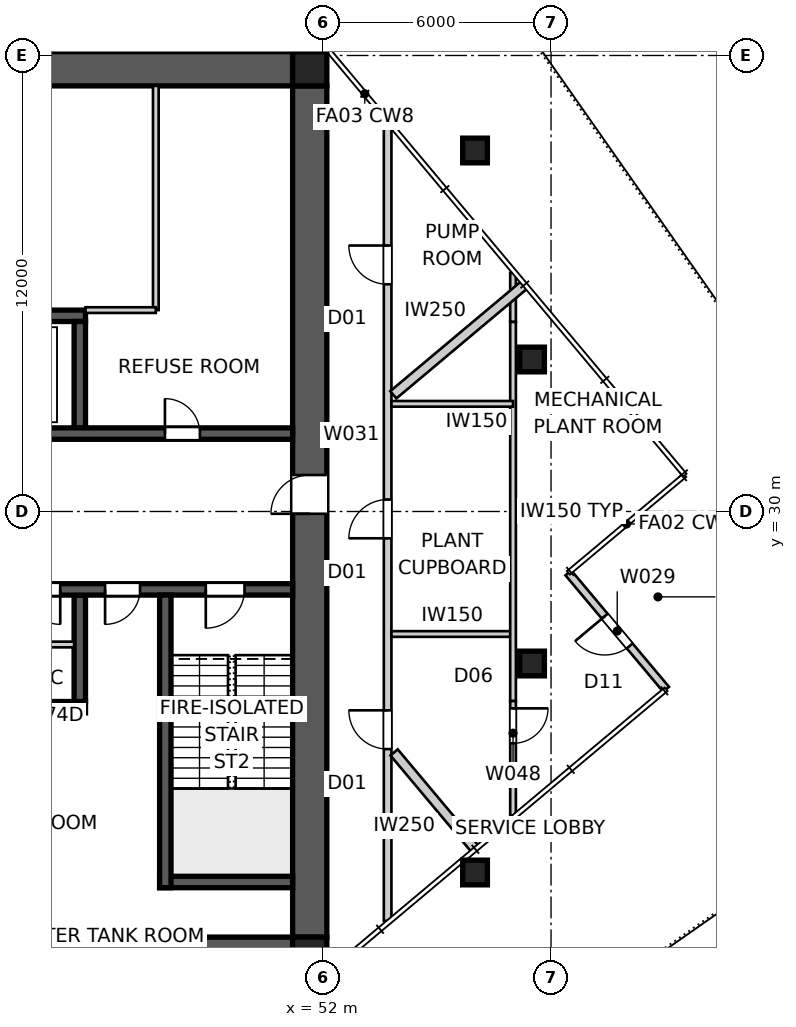
"""IFC4 building model, lengths in metres.
Left out: names, types, materials, properties, quantities, classifications, styles, units other than length and angle.
Written with IfcOpenShell. Run it as: python <this file> out.ifc"""

import sys

from ifc_helpers import new_model, si_unit, direction, frame, frame_2d, origin, origin_2d, place, context, subcontext, project, spatial, polyline, rectangle, outline, extrude, element, fill, save


model = new_model("IFC4")
c1 = context("Model", 3, precision=1e-05, world=origin(), true_north=direction((0.0, 1.0)))
c2 = subcontext(c1, "Body", "Model", "MODEL_VIEW")
j1 = project(units=[si_unit("LENGTHUNIT", "METRE"), si_unit("PLANEANGLEUNIT", "RADIAN")], contexts=[c1])
p1 = place(None, origin())
s1 = spatial("IfcSite", under=j1, at=p1, CompositionType="ELEMENT")
p2 = place(p1, origin())
s2 = spatial("IfcBuilding", under=s1, at=p2, CompositionType="ELEMENT")
p3 = place(p2, frame((0.0, 0.0, 267.6)))
s3 = spatial("IfcBuildingStorey", under=s2, at=p3, CompositionType="ELEMENT", Elevation=267.6)
for number, where, z_axis, x_axis in (
    (1, (28.8, 41.65, 0.0), (0.0, 0.0, 1.0), (1.0, 0.0, 0.0)),
    (2, (51.2, 18.35, 0.0), (0.0, 0.0, 1.0), (-1.0, 0.0, 0.0)),
):
    element("IfcWall", number, at=place(p3, frame(where, z_axis=z_axis, x_axis=x_axis)), inside=s3, PredefinedType="SHEAR", context=c2, shape_type="SweptSolid", body=[
        extrude(outline(polyline([(0.0, -0.45), (22.4, -0.45), (22.4, -0.025), (22.85, -0.025), (22.85, 0.025), (22.4, 0.025), (22.4, 0.45), (0.0, 0.45), (0.0, 0.025), (-0.45, 0.025), (-0.45, -0.025), (0.0, -0.025), (0.0, -0.45)])), origin(), (0.0, 0.0, 1.0), 5.0),
    ])
p4 = place(p3, frame((51.65, 18.8, 0.0), z_axis=(0.0, 0.0, 1.0), x_axis=(0.0, 1.0, 0.0)))
e3 = element("IfcWall", 3, at=p4, inside=s3, PredefinedType="SHEAR", context=c2, shape_type="SweptSolid", body=[
    extrude(outline(polyline([(0.0, -0.45), (22.4, -0.45), (22.4, -0.025), (22.85, -0.025), (22.85, 0.025), (22.4, 0.025), (22.4, 0.45), (0.0, 0.45), (0.0, 0.025), (-0.45, 0.025), (-0.45, -0.025), (0.0, -0.025), (0.0, -0.45)])), origin(), (0.0, 0.0, 1.0), 5.0),
])
p5 = place(p4, frame((11.14, 0.0, 0.0)))
e4 = element("IfcOpeningElement", 4, at=p5, cuts=e3, PredefinedType="OPENING", context=c2, shape_type="SweptSolid", body=[
    extrude(rectangle(XDim=1.02, YDim=2.4, at=frame_2d((0.51, 1.2))), frame((0.0, 0.46, 0.0), z_axis=(0.0, -1.0, 0.0), x_axis=(1.0, 0.0, 0.0)), (0.0, 0.0, 1.0), 0.92),
])
p6 = place(p3, frame((28.8, 32.05, 0.0), z_axis=(0.0, 0.0, 1.0), x_axis=(1.0, 0.0, 0.0)))
e5 = element("IfcWall", 5, at=p6, inside=s3, PredefinedType="SHEAR", context=c2, shape_type="SweptSolid", body=[
    extrude(rectangle(XDim=22.4, YDim=0.3, at=frame_2d((11.2, 0.0))), origin(), (0.0, 0.0, 1.0), 5.0),
])
p7 = place(p6, frame((19.04, 0.0, 0.0)))
e6 = element("IfcOpeningElement", 6, at=p7, cuts=e5, PredefinedType="OPENING", context=c2, shape_type="SweptSolid", body=[
    extrude(rectangle(XDim=0.92, YDim=2.1, at=frame_2d((0.46, 1.05))), frame((0.0, 0.16, 0.0), z_axis=(0.0, -1.0, 0.0), x_axis=(1.0, 0.0, 0.0)), (0.0, 0.0, 1.0), 0.32),
])
p8 = place(p6, frame((1.265, 0.0, 0.0)))
e7 = element("IfcOpeningElement", 7, at=p8, cuts=e5, PredefinedType="OPENING", context=c2, shape_type="SweptSolid", body=[
    extrude(rectangle(XDim=1.02, YDim=2.1, at=frame_2d((0.51, 1.05))), frame((0.0, 0.16, 0.0), z_axis=(0.0, -1.0, 0.0), x_axis=(1.0, 0.0, 0.0)), (0.0, 0.0, 1.0), 0.32),
])
p9 = place(p6, frame((4.015, 0.0, 0.0)))
e8 = element("IfcOpeningElement", 8, at=p9, cuts=e5, PredefinedType="OPENING", context=c2, shape_type="SweptSolid", body=[
    extrude(rectangle(XDim=0.92, YDim=2.1, at=frame_2d((0.46, 1.05))), frame((0.0, 0.16, 0.0), z_axis=(0.0, -1.0, 0.0), x_axis=(1.0, 0.0, 0.0)), (0.0, 0.0, 1.0), 0.32),
])
p10 = place(p6, frame((7.015, 0.0, 0.0)))
e9 = element("IfcOpeningElement", 9, at=p10, cuts=e5, PredefinedType="OPENING", context=c2, shape_type="SweptSolid", body=[
    extrude(rectangle(XDim=0.92, YDim=2.1, at=frame_2d((0.46, 1.05))), frame((0.0, 0.16, 0.0), z_axis=(0.0, -1.0, 0.0), x_axis=(1.0, 0.0, 0.0)), (0.0, 0.0, 1.0), 0.32),
])
p11 = place(p6, frame((9.34, 0.0, 0.0)))
e10 = element("IfcOpeningElement", 10, at=p11, cuts=e5, PredefinedType="OPENING", context=c2, shape_type="SweptSolid", body=[
    extrude(rectangle(XDim=0.92, YDim=2.1, at=frame_2d((0.46, 1.05))), frame((0.0, 0.16, 0.0), z_axis=(0.0, -1.0, 0.0), x_axis=(1.0, 0.0, 0.0)), (0.0, 0.0, 1.0), 0.32),
])
p12 = place(p6, frame((12.05, 0.0, 0.0)))
e11 = element("IfcOpeningElement", 11, at=p12, cuts=e5, PredefinedType="OPENING", context=c2, shape_type="SweptSolid", body=[
    extrude(rectangle(XDim=1.1, YDim=2.1, at=frame_2d((0.55, 1.05))), frame((0.0, 0.16, 0.0), z_axis=(0.0, -1.0, 0.0), x_axis=(1.0, 0.0, 0.0)), (0.0, 0.0, 1.0), 0.32),
])
p13 = place(p6, frame((14.85, 0.0, 0.0)))
e12 = element("IfcOpeningElement", 12, at=p13, cuts=e5, PredefinedType="OPENING", context=c2, shape_type="SweptSolid", body=[
    extrude(rectangle(XDim=1.1, YDim=2.1, at=frame_2d((0.55, 1.05))), frame((0.0, 0.16, 0.0), z_axis=(0.0, -1.0, 0.0), x_axis=(1.0, 0.0, 0.0)), (0.0, 0.0, 1.0), 0.32),
])
p14 = place(p3, frame((51.2, 27.95, 0.0), z_axis=(0.0, 0.0, 1.0), x_axis=(-1.0, 0.0, 0.0)))
e13 = element("IfcWall", 13, at=p14, inside=s3, PredefinedType="SHEAR", context=c2, shape_type="SweptSolid", body=[
    extrude(rectangle(XDim=22.4, YDim=0.3, at=frame_2d((11.2, 0.0))), origin(), (0.0, 0.0, 1.0), 5.0),
])
p15 = place(p14, frame((19.04, 0.0, 0.0)))
e14 = element("IfcOpeningElement", 14, at=p15, cuts=e13, PredefinedType="OPENING", context=c2, shape_type="SweptSolid", body=[
    extrude(rectangle(XDim=0.92, YDim=2.1, at=frame_2d((0.46, 1.05))), frame((0.0, 0.16, 0.0), z_axis=(0.0, -1.0, 0.0), x_axis=(1.0, 0.0, 0.0)), (0.0, 0.0, 1.0), 0.32),
])
p16 = place(p14, frame((1.265, 0.0, 0.0)))
e15 = element("IfcOpeningElement", 15, at=p16, cuts=e13, PredefinedType="OPENING", context=c2, shape_type="SweptSolid", body=[
    extrude(rectangle(XDim=1.02, YDim=2.1, at=frame_2d((0.51, 1.05))), frame((0.0, 0.16, 0.0), z_axis=(0.0, -1.0, 0.0), x_axis=(1.0, 0.0, 0.0)), (0.0, 0.0, 1.0), 0.32),
])
p17 = place(p14, frame((4.015, 0.0, 0.0)))
e16 = element("IfcOpeningElement", 16, at=p17, cuts=e13, PredefinedType="OPENING", context=c2, shape_type="SweptSolid", body=[
    extrude(rectangle(XDim=0.92, YDim=2.1, at=frame_2d((0.46, 1.05))), frame((0.0, 0.16, 0.0), z_axis=(0.0, -1.0, 0.0), x_axis=(1.0, 0.0, 0.0)), (0.0, 0.0, 1.0), 0.32),
])
p18 = place(p14, frame((9.79, 0.0, 0.0)))
e17 = element("IfcOpeningElement", 17, at=p18, cuts=e13, PredefinedType="OPENING", context=c2, shape_type="SweptSolid", body=[
    extrude(rectangle(XDim=0.92, YDim=2.1, at=frame_2d((0.46, 1.05))), frame((0.0, 0.16, 0.0), z_axis=(0.0, -1.0, 0.0), x_axis=(1.0, 0.0, 0.0)), (0.0, 0.0, 1.0), 0.32),
])
p19 = place(p14, frame((6.115, 0.0, 0.0)))
e18 = element("IfcOpeningElement", 18, at=p19, cuts=e13, PredefinedType="OPENING", context=c2, shape_type="SweptSolid", body=[
    extrude(rectangle(XDim=0.92, YDim=2.1, at=frame_2d((0.46, 1.05))), frame((0.0, 0.16, 0.0), z_axis=(0.0, -1.0, 0.0), x_axis=(1.0, 0.0, 0.0)), (0.0, 0.0, 1.0), 0.32),
])
p20 = place(p14, frame((12.05, 0.0, 0.0)))
e19 = element("IfcOpeningElement", 19, at=p20, cuts=e13, PredefinedType="OPENING", context=c2, shape_type="SweptSolid", body=[
    extrude(rectangle(XDim=1.1, YDim=2.1, at=frame_2d((0.55, 1.05))), frame((0.0, 0.16, 0.0), z_axis=(0.0, -1.0, 0.0), x_axis=(1.0, 0.0, 0.0)), (0.0, 0.0, 1.0), 0.32),
])
p21 = place(p14, frame((14.85, 0.0, 0.0)))
e20 = element("IfcOpeningElement", 20, at=p21, cuts=e13, PredefinedType="OPENING", context=c2, shape_type="SweptSolid", body=[
    extrude(rectangle(XDim=1.1, YDim=2.1, at=frame_2d((0.55, 1.05))), frame((0.0, 0.16, 0.0), z_axis=(0.0, -1.0, 0.0), x_axis=(1.0, 0.0, 0.0)), (0.0, 0.0, 1.0), 0.32),
])
for number, where, z_axis, x_axis in (
    (21, (34.25, 35.15, 0.0), (0.0, 0.0, 1.0), (1.0, 0.0, 0.0)),
    (22, (45.75, 24.85, 0.0), (0.0, 0.0, 1.0), (-1.0, 0.0, 0.0)),
):
    element("IfcWall", number, at=place(p3, frame(where, z_axis=z_axis, x_axis=x_axis)), inside=s3, PredefinedType="SHEAR", context=c2, shape_type="SweptSolid", body=[
        extrude(rectangle(XDim=11.5, YDim=0.3, at=frame_2d((5.75, 0.0))), origin(), (0.0, 0.0, 1.0), 5.0),
    ])
for number, where, z_axis, x_axis in (
    (23, (45.6, 27.8, 0.0), (0.0, 0.0, 1.0), (0.0, -1.0, 0.0)),
    (24, (45.6, 32.2, 0.0), (0.0, 0.0, 1.0), (0.0, 1.0, 0.0)),
):
    element("IfcWall", number, at=place(p3, frame(where, z_axis=z_axis, x_axis=x_axis)), inside=s3, PredefinedType="SHEAR", context=c2, shape_type="SweptSolid", body=[
        extrude(rectangle(XDim=2.8, YDim=0.3, at=frame_2d((1.4, 0.0))), origin(), (0.0, 0.0, 1.0), 5.0),
    ])
p22 = place(p3, frame((47.85, 27.8, 0.0), z_axis=(0.0, 0.0, 1.0), x_axis=(0.0, -1.0, 0.0)))
e25 = element("IfcWall", 25, at=p22, inside=s3, PredefinedType="SHEAR", context=c2, shape_type="SweptSolid", body=[
    extrude(rectangle(XDim=7.7, YDim=0.3, at=frame_2d((3.85, 0.0))), origin(), (0.0, 0.0, 1.0), 5.0),
])
p23 = place(p3, frame((51.2, 20.25, 0.0), z_axis=(0.0, 0.0, 1.0), x_axis=(-1.0, 0.0, 0.0)))
e26 = element("IfcWall", 26, at=p23, inside=s3, PredefinedType="SHEAR", context=c2, shape_type="SweptSolid", body=[
    extrude(rectangle(XDim=3.5, YDim=0.3, at=frame_2d((1.75, 0.0))), origin(), (0.0, 0.0, 1.0), 5.0),
])
for number, where, z_axis, x_axis in (
    (27, (51.65, 18.35, 0.0), (0.0, 0.0, 1.0), (1.0, 0.0, 0.0)),
    (28, (51.65, 41.65, 0.0), (0.0, 0.0, 1.0), (1.0, 0.0, 0.0)),
):
    element("IfcColumn", number, at=place(p3, frame(where, z_axis=z_axis, x_axis=x_axis)), inside=s3, PredefinedType="COLUMN", context=c2, shape_type="SweptSolid", body=[
        extrude(rectangle(XDim=0.9, YDim=0.9, at=origin_2d()), origin(), (0.0, 0.0, 1.0), 5.0),
    ])
for number, where, z_axis, x_axis in (
    (29, (57.5, 26.0, 0.0), (0.0, 0.0, 1.0), (1.0, 0.0, 0.0)),
    (30, (57.5, 34.0, 0.0), (0.0, 0.0, 1.0), (1.0, 0.0, 0.0)),
    (31, (56.0, 39.5, 0.0), (0.0, 0.0, 1.0), (1.0, 0.0, 0.0)),
    (32, (56.0, 20.5, 0.0), (0.0, 0.0, 1.0), (1.0, 0.0, 0.0)),
):
    element("IfcColumn", number, at=place(p3, frame(where, z_axis=z_axis, x_axis=x_axis)), inside=s3, PredefinedType="COLUMN", context=c2, shape_type="SweptSolid", body=[
        extrude(rectangle(XDim=0.65, YDim=0.65, at=origin_2d()), origin(), (0.0, 0.0, 1.0), 5.0),
    ])
p24 = place(p3, frame((61.027, 25.321, 0.0), z_axis=(0.0, 0.0, 1.0), x_axis=(-0.642768287094, 0.766060656284, 0.0)))
e33 = element("IfcWall", 33, at=p24, inside=s3, PredefinedType="SOLIDWALL", context=c2, shape_type="SweptSolid", body=[
    extrude(rectangle(XDim=4.0, YDim=0.2, at=frame_2d((2.0, 0.0))), origin(), (0.0, 0.0, 1.0), 4.85),
])
p25 = place(p24, frame((1.49, 0.0, 0.0)))
e34 = element("IfcOpeningElement", 34, at=p25, cuts=e33, PredefinedType="OPENING", context=c2, shape_type="SweptSolid", body=[
    extrude(rectangle(XDim=1.02, YDim=2.1, at=frame_2d((0.51, 1.05))), frame((0.0, 0.11, 0.0), z_axis=(0.0, -1.0, 0.0), x_axis=(1.0, 0.0, 0.0)), (0.0, 0.0, 1.0), 0.22),
])
p26 = place(p3, frame((53.7, 19.225, 0.0), z_axis=(0.0, 0.0, 1.0), x_axis=(0.0, 1.0, 0.0)))
e35 = element("IfcWall", 35, at=p26, inside=s3, PredefinedType="PARTITIONING", context=c2, shape_type="SweptSolid", body=[
    extrude(rectangle(XDim=20.988, YDim=0.2, at=frame_2d((10.494, 0.0))), origin(), (0.0, 0.0, 1.0), 4.85),
])
p27 = place(p26, frame((4.522, 0.0, 0.0)))
e36 = element("IfcOpeningElement", 36, at=p27, cuts=e35, PredefinedType="OPENING", context=c2, shape_type="SweptSolid", body=[
    extrude(rectangle(XDim=1.02, YDim=2.34, at=frame_2d((0.51, 1.17))), frame((0.0, 0.11, 0.0), z_axis=(0.0, -1.0, 0.0), x_axis=(1.0, 0.0, 0.0)), (0.0, 0.0, 1.0), 0.22),
])
p28 = place(p26, frame((16.754, 0.0, 0.0)))
e37 = element("IfcOpeningElement", 37, at=p28, cuts=e35, PredefinedType="OPENING", context=c2, shape_type="SweptSolid", body=[
    extrude(rectangle(XDim=1.02, YDim=2.34, at=frame_2d((0.51, 1.17))), frame((0.0, 0.11, 0.0), z_axis=(0.0, -1.0, 0.0), x_axis=(1.0, 0.0, 0.0)), (0.0, 0.0, 1.0), 0.22),
])
p29 = place(p26, frame((10.069, 0.0, 0.0)))
e38 = element("IfcOpeningElement", 38, at=p29, cuts=e35, PredefinedType="OPENING", context=c2, shape_type="SweptSolid", body=[
    extrude(rectangle(XDim=1.02, YDim=2.34, at=frame_2d((0.51, 1.17))), frame((0.0, 0.11, 0.0), z_axis=(0.0, -1.0, 0.0), x_axis=(1.0, 0.0, 0.0)), (0.0, 0.0, 1.0), 0.22),
])
p30 = place(p3, frame((56.009, 21.111, 0.0), z_axis=(0.0, 0.0, 1.0), x_axis=(-0.642756724565, 0.766070357753, 0.0)))
e39 = element("IfcWall", 39, at=p30, inside=s3, PredefinedType="PARTITIONING", context=c2, shape_type="SweptSolid", body=[
    extrude(rectangle(XDim=3.328, YDim=0.25, at=frame_2d((1.664, 0.0))), origin(), (0.0, 0.0, 1.0), 4.85),
])
p31 = place(p3, frame((57.31, 35.974, 0.0), z_axis=(0.0, 0.0, 1.0), x_axis=(-0.766036989917, -0.642796491962, 0.0)))
e40 = element("IfcWall", 40, at=p31, inside=s3, PredefinedType="PARTITIONING", context=c2, shape_type="SweptSolid", body=[
    extrude(rectangle(XDim=4.517, YDim=0.25, at=frame_2d((2.258, 0.0))), origin(), (0.0, 0.0, 1.0), 4.85),
])
p32 = place(p3, frame((47.6, 41.2, 0.0), z_axis=(0.0, 0.0, 1.0), x_axis=(0.0, -1.0, 0.0)))
e41 = element("IfcWall", 41, at=p32, inside=s3, PredefinedType="SOLIDWALL", context=c2, shape_type="SweptSolid", body=[
    extrude(rectangle(XDim=5.9, YDim=0.15, at=frame_2d((2.95, 0.0))), origin(), (0.0, 0.0, 1.0), 4.85),
])
p33 = place(p3, frame((47.6, 35.3, 0.0), z_axis=(0.0, 0.0, 1.0), x_axis=(-1.0, 0.0, 0.0)))
e42 = element("IfcWall", 42, at=p33, inside=s3, PredefinedType="SOLIDWALL", context=c2, shape_type="SweptSolid", body=[
    extrude(rectangle(XDim=1.85, YDim=0.15, at=frame_2d((0.925, 0.0))), origin(), (0.0, 0.0, 1.0), 4.85),
])
p34 = place(p3, frame((53.8, 26.776, 0.0), z_axis=(0.0, 0.0, 1.0), x_axis=(1.0, 0.0, 0.0)))
e43 = element("IfcWall", 43, at=p34, inside=s3, PredefinedType="SOLIDWALL", context=c2, shape_type="SweptSolid", body=[
    extrude(rectangle(XDim=3.2, YDim=0.15, at=frame_2d((1.6, 0.0))), origin(), (0.0, 0.0, 1.0), 4.85),
])
p35 = place(p3, frame((57.0, 36.281, 0.0), z_axis=(0.0, 0.0, 1.0), x_axis=(0.0, -1.0, 0.0)))
e44 = element("IfcWall", 44, at=p35, inside=s3, PredefinedType="SOLIDWALL", context=c2, shape_type="SweptSolid", body=[
    extrude(rectangle(XDim=1.292, YDim=0.15, at=frame_2d((0.646, 0.0))), origin(), (0.0, 0.0, 1.0), 3.85),
])
p36 = place(p3, frame((57.0, 34.988, 0.0), z_axis=(0.0, 0.0, 1.0), x_axis=(0.0, -1.0, 0.0)))
e45 = element("IfcWall", 45, at=p36, inside=s3, PredefinedType="SOLIDWALL", context=c2, shape_type="SweptSolid", body=[
    extrude(rectangle(XDim=9.977, YDim=0.15, at=frame_2d((4.988, 0.0))), origin(), (0.0, 0.0, 1.0), 4.85),
])
p37 = place(p3, frame((57.0, 25.012, 0.0), z_axis=(0.0, 0.0, 1.0), x_axis=(0.0, -1.0, 0.0)))
e46 = element("IfcWall", 46, at=p37, inside=s3, PredefinedType="SOLIDWALL", context=c2, shape_type="SweptSolid", body=[
    extrude(rectangle(XDim=1.69, YDim=0.15, at=frame_2d((0.845, 0.0))), origin(), (0.0, 0.0, 1.0), 3.85),
])
p38 = place(p37, frame((0.193, 0.0, 0.0)))
e47 = element("IfcOpeningElement", 47, at=p38, cuts=e46, PredefinedType="OPENING", context=c2, shape_type="SweptSolid", body=[
    extrude(rectangle(XDim=0.92, YDim=2.1, at=frame_2d((0.46, 1.05))), frame((0.0, 0.085, 0.0), z_axis=(0.0, -1.0, 0.0), x_axis=(1.0, 0.0, 0.0)), (0.0, 0.0, 1.0), 0.17),
])
p39 = place(p3, frame((57.0, 23.322, 0.0), z_axis=(0.0, 0.0, 1.0), x_axis=(0.0, -1.0, 0.0)))
e48 = element("IfcWall", 48, at=p39, inside=s3, PredefinedType="SOLIDWALL", context=c2, shape_type="SweptSolid", body=[
    extrude(rectangle(XDim=1.327, YDim=0.15, at=frame_2d((0.664, 0.0))), origin(), (0.0, 0.0, 1.0), 4.85),
])
p40 = place(p3, frame((57.0, 32.833, 0.0), z_axis=(0.0, 0.0, 1.0), x_axis=(-1.0, 0.0, 0.0)))
e49 = element("IfcWall", 49, at=p40, inside=s3, PredefinedType="SOLIDWALL", context=c2, shape_type="SweptSolid", body=[
    extrude(rectangle(XDim=3.2, YDim=0.15, at=frame_2d((1.6, 0.0))), origin(), (0.0, 0.0, 1.0), 4.321),
])
p41 = place(p3, frame((40.1, 26.5, 0.0), z_axis=(0.0, 0.0, 1.0), x_axis=(1.0, 0.0, 0.0)))
e50 = element("IfcWall", 50, at=p41, inside=s3, PredefinedType="SOLIDWALL", context=c2, shape_type="SweptSolid", body=[
    extrude(rectangle(XDim=5.35, YDim=0.15, at=frame_2d((2.675, 0.0))), origin(), (0.0, 0.0, 1.0), 4.85),
])
p42 = place(p41, frame((2.215, 0.0, 0.0)))
e51 = element("IfcOpeningElement", 51, at=p42, cuts=e50, PredefinedType="OPENING", context=c2, shape_type="SweptSolid", body=[
    extrude(rectangle(XDim=0.92, YDim=2.1, at=frame_2d((0.46, 1.05))), frame((0.0, 0.085, 0.0), z_axis=(0.0, -1.0, 0.0), x_axis=(1.0, 0.0, 0.0)), (0.0, 0.0, 1.0), 0.17),
])
p43 = place(p25, origin())
e52 = element("IfcDoor", 52, at=p43, inside=s3, OperationType="SINGLE_SWING_RIGHT", PredefinedType="DOOR", context=c2, shape_type="SweptSolid", body=[
    extrude(rectangle(XDim=1.02, YDim=2.1, at=frame_2d((0.51, 1.05))), frame((0.0, 0.025, 0.0), z_axis=(0.0, -1.0, 0.0), x_axis=(1.0, 0.0, 0.0)), (0.0, 0.0, 1.0), 0.05),
])
fill(e34, e52)
p44 = place(p7, origin())
e53 = element("IfcDoor", 53, at=p44, inside=s3, OperationType="SINGLE_SWING_LEFT", PredefinedType="DOOR", context=c2, shape_type="SweptSolid", body=[
    extrude(rectangle(XDim=0.92, YDim=2.1, at=frame_2d((0.46, 1.05))), frame((0.0, 0.025, 0.0), z_axis=(0.0, -1.0, 0.0), x_axis=(1.0, 0.0, 0.0)), (0.0, 0.0, 1.0), 0.05),
])
fill(e6, e53)
p45 = place(p16, origin())
e54 = element("IfcDoor", 54, at=p45, inside=s3, OperationType="SINGLE_SWING_RIGHT", PredefinedType="DOOR", context=c2, shape_type="SweptSolid", body=[
    extrude(rectangle(XDim=1.02, YDim=2.1, at=frame_2d((0.51, 1.05))), frame((0.0, 0.025, 0.0), z_axis=(0.0, -1.0, 0.0), x_axis=(1.0, 0.0, 0.0)), (0.0, 0.0, 1.0), 0.05),
])
fill(e15, e54)
p46 = place(p17, origin())
e55 = element("IfcDoor", 55, at=p46, inside=s3, OperationType="SINGLE_SWING_RIGHT", PredefinedType="DOOR", context=c2, shape_type="SweptSolid", body=[
    extrude(rectangle(XDim=0.92, YDim=2.1, at=frame_2d((0.46, 1.05))), frame((0.0, 0.025, 0.0), z_axis=(0.0, -1.0, 0.0), x_axis=(1.0, 0.0, 0.0)), (0.0, 0.0, 1.0), 0.05),
])
fill(e16, e55)
p47 = place(p27, origin())
e56 = element("IfcDoor", 56, at=p47, inside=s3, OperationType="SINGLE_SWING_RIGHT", PredefinedType="DOOR", context=c2, shape_type="SweptSolid", body=[
    extrude(rectangle(XDim=1.02, YDim=2.34, at=frame_2d((0.51, 1.17))), frame((0.0, 0.025, 0.0), z_axis=(0.0, -1.0, 0.0), x_axis=(1.0, 0.0, 0.0)), (0.0, 0.0, 1.0), 0.05),
])
fill(e36, e56)
p48 = place(p28, origin())
e57 = element("IfcDoor", 57, at=p48, inside=s3, OperationType="SINGLE_SWING_RIGHT", PredefinedType="DOOR", context=c2, shape_type="SweptSolid", body=[
    extrude(rectangle(XDim=1.02, YDim=2.34, at=frame_2d((0.51, 1.17))), frame((0.0, 0.025, 0.0), z_axis=(0.0, -1.0, 0.0), x_axis=(1.0, 0.0, 0.0)), (0.0, 0.0, 1.0), 0.05),
])
fill(e37, e57)
p49 = place(p29, origin())
e58 = element("IfcDoor", 58, at=p49, inside=s3, OperationType="SINGLE_SWING_LEFT", PredefinedType="DOOR", context=c2, shape_type="SweptSolid", body=[
    extrude(rectangle(XDim=1.02, YDim=2.34, at=frame_2d((0.51, 1.17))), frame((0.0, 0.025, 0.0), z_axis=(0.0, -1.0, 0.0), x_axis=(1.0, 0.0, 0.0)), (0.0, 0.0, 1.0), 0.05),
])
fill(e38, e58)
p50 = place(p38, origin())
e59 = element("IfcDoor", 59, at=p50, inside=s3, OperationType="SINGLE_SWING_LEFT", PredefinedType="DOOR", context=c2, shape_type="SweptSolid", body=[
    extrude(rectangle(XDim=0.92, YDim=2.1, at=frame_2d((0.46, 1.05))), frame((0.0, 0.025, 0.0), z_axis=(0.0, -1.0, 0.0), x_axis=(1.0, 0.0, 0.0)), (0.0, 0.0, 1.0), 0.05),
])
fill(e47, e59)
p51 = place(p19, origin())
e60 = element("IfcDoor", 60, at=p51, inside=s3, OperationType="SINGLE_SWING_LEFT", PredefinedType="DOOR", context=c2, shape_type="SweptSolid", body=[
    extrude(rectangle(XDim=0.92, YDim=2.1, at=frame_2d((0.46, 1.05))), frame((0.0, 0.025, 0.0), z_axis=(0.0, -1.0, 0.0), x_axis=(1.0, 0.0, 0.0)), (0.0, 0.0, 1.0), 0.05),
])
fill(e18, e60)
p52 = place(p5, origin())
e61 = element("IfcDoor", 61, at=p52, inside=s3, OperationType="SINGLE_SWING_LEFT", PredefinedType="DOOR", context=c2, shape_type="SweptSolid", body=[
    extrude(rectangle(XDim=1.02, YDim=2.4, at=frame_2d((0.51, 1.2))), frame((0.0, 0.025, 0.0), z_axis=(0.0, -1.0, 0.0), x_axis=(1.0, 0.0, 0.0)), (0.0, 0.0, 1.0), 0.05),
])
fill(e4, e61)
save(model, sys.argv[1])
